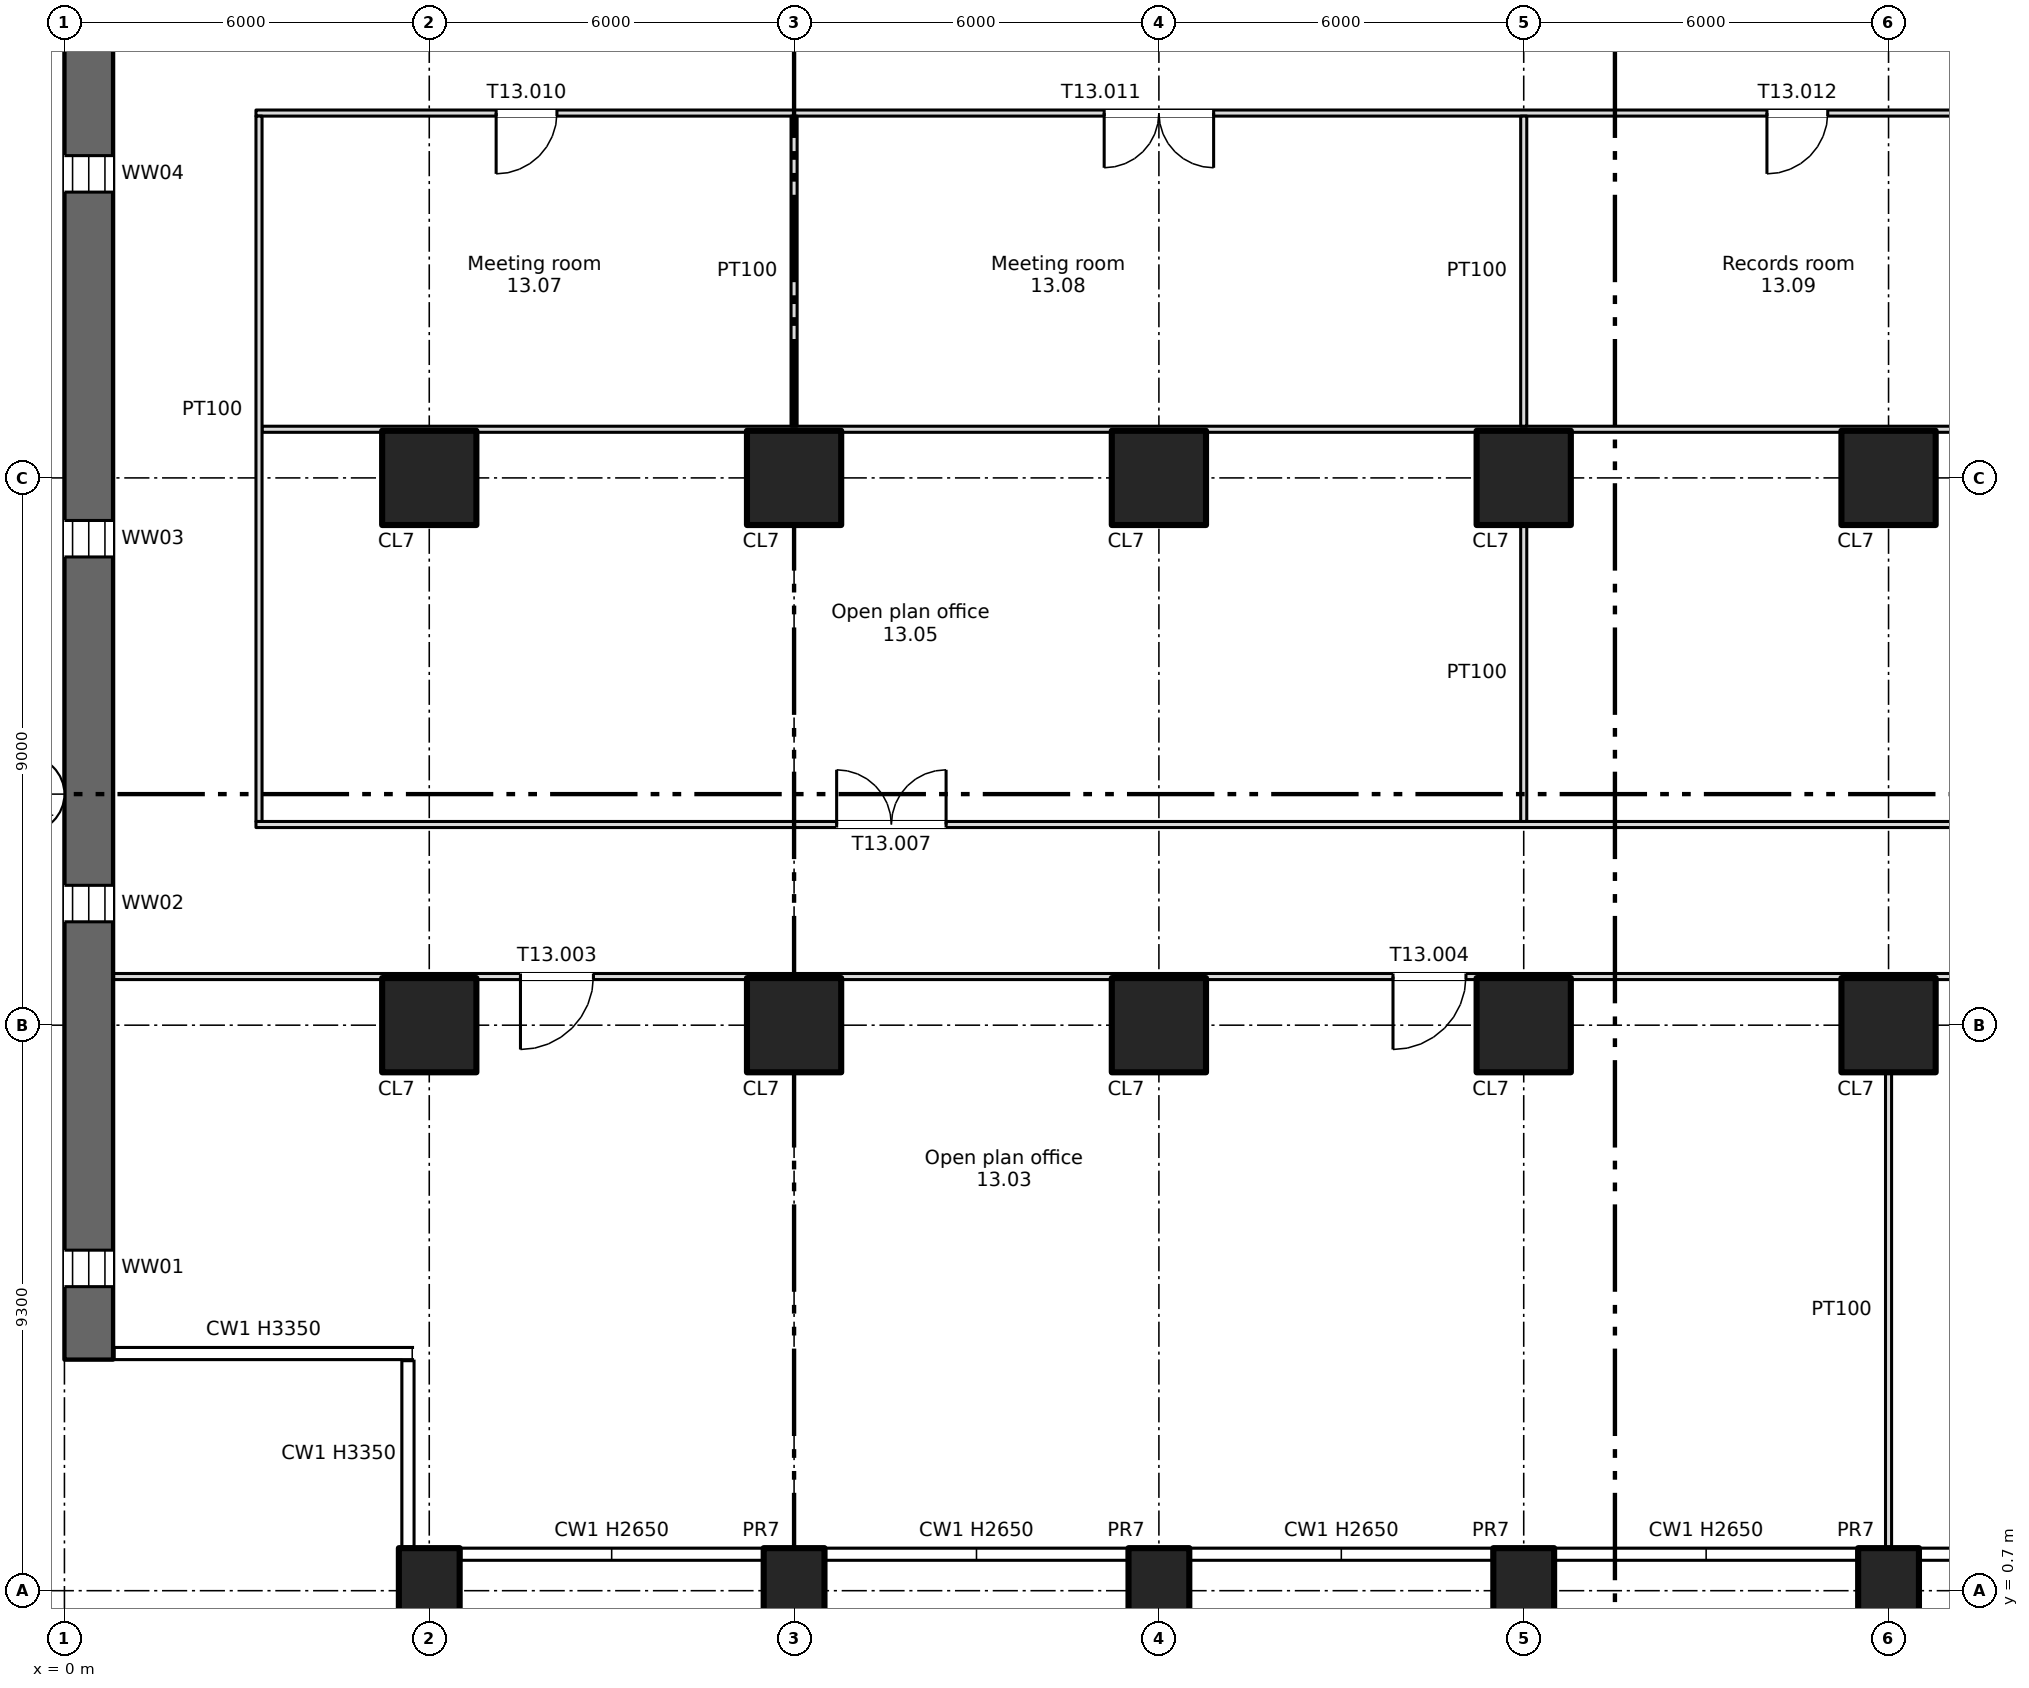
"""IFC4 building model, lengths in metres.
Left out: names, types, materials, properties, quantities, classifications, styles, units other than length and angle.
Written with IfcOpenShell. Run it as: python <this file> out.ifc"""

import sys

from ifc_helpers import new_model, si_unit, direction, frame, frame_2d, origin, origin_2d, place, context, subcontext, project, spatial, rectangle, extrude, element, fill, save


model = new_model("IFC4")
c1 = context("Model", 3, precision=1e-05, world=origin(), true_north=direction((0.0, 1.0)))
c2 = subcontext(c1, "Body", "Model", "MODEL_VIEW")
j1 = project(units=[si_unit("LENGTHUNIT", "METRE"), si_unit("PLANEANGLEUNIT", "RADIAN")], contexts=[c1])
p1 = place(None, origin())
s1 = spatial("IfcSite", under=j1, at=p1, CompositionType="ELEMENT")
p2 = place(p1, origin())
s2 = spatial("IfcBuilding", under=s1, at=p2, CompositionType="ELEMENT")
p3 = place(p2, frame((0.0, 0.0, 75.0)))
s3 = spatial("IfcBuildingStorey", under=s2, at=p3, CompositionType="ELEMENT", Elevation=75.0)
for number, where, z_axis, x_axis in (
    (1, (6.0, 0.7, -0.4), (0.0, 0.0, 1.0), (1.0, 0.0, 0.0)),
    (2, (12.0, 0.7, -0.4), (0.0, 0.0, 1.0), (1.0, 0.0, 0.0)),
    (3, (18.0, 0.7, -0.4), (0.0, 0.0, 1.0), (1.0, 0.0, 0.0)),
    (4, (24.0, 0.7, -0.4), (0.0, 0.0, 1.0), (1.0, 0.0, 0.0)),
    (5, (30.0, 0.7, -0.4), (0.0, 0.0, 1.0), (1.0, 0.0, 0.0)),
):
    element("IfcColumn", number, at=place(p3, frame(where, z_axis=z_axis, x_axis=x_axis)), inside=s3, PredefinedType="COLUMN", context=c2, shape_type="SweptSolid", body=[
        extrude(rectangle(XDim=1.0, YDim=1.4, at=origin_2d()), origin(), (0.0, 0.0, 1.0), 3.75),
    ])
for number, where, z_axis, x_axis in (
    (6, (6.0, 10.0, 0.0), (0.0, 0.0, 1.0), (1.0, 0.0, 0.0)),
    (7, (6.0, 19.0, 0.0), (0.0, 0.0, 1.0), (1.0, 0.0, 0.0)),
    (8, (12.0, 10.0, 0.0), (0.0, 0.0, 1.0), (1.0, 0.0, 0.0)),
    (9, (12.0, 19.0, 0.0), (0.0, 0.0, 1.0), (1.0, 0.0, 0.0)),
    (10, (18.0, 10.0, 0.0), (0.0, 0.0, 1.0), (1.0, 0.0, 0.0)),
    (11, (18.0, 19.0, 0.0), (0.0, 0.0, 1.0), (1.0, 0.0, 0.0)),
    (12, (24.0, 10.0, 0.0), (0.0, 0.0, 1.0), (1.0, 0.0, 0.0)),
    (13, (24.0, 19.0, 0.0), (0.0, 0.0, 1.0), (1.0, 0.0, 0.0)),
    (14, (30.0, 10.0, 0.0), (0.0, 0.0, 1.0), (1.0, 0.0, 0.0)),
    (15, (30.0, 19.0, 0.0), (0.0, 0.0, 1.0), (1.0, 0.0, 0.0)),
):
    element("IfcColumn", number, at=place(p3, frame(where, z_axis=z_axis, x_axis=x_axis)), inside=s3, PredefinedType="COLUMN", context=c2, shape_type="SweptSolid", body=[
        extrude(rectangle(XDim=1.55, YDim=1.55, at=origin_2d()), origin(), (0.0, 0.0, 1.0), 3.35),
    ])
p4 = place(p3, frame((0.4, 4.5, 0.0), z_axis=(0.0, 0.0, 1.0), x_axis=(0.0, 1.0, 0.0)))
e16 = element("IfcWall", 16, at=p4, inside=s3, PredefinedType="SHEAR", context=c2, shape_type="SweptSolid", body=[
    extrude(rectangle(XDim=37.0, YDim=0.8, at=frame_2d((18.5, 0.0))), origin(), (0.0, 0.0, 1.0), 3.35),
])
p5 = place(p4, frame((1.2, 0.0, 0.6)))
e17 = element("IfcOpeningElement", 17, at=p5, cuts=e16, PredefinedType="OPENING", context=c2, shape_type="SweptSolid", body=[
    extrude(rectangle(XDim=0.6, YDim=2.4, at=frame_2d((0.3, 1.2))), frame((0.0, 0.41, 0.0), z_axis=(0.0, -1.0, 0.0), x_axis=(1.0, 0.0, 0.0)), (0.0, 0.0, 1.0), 0.82),
])
p6 = place(p4, frame((7.2, 0.0, 0.6)))
e18 = element("IfcOpeningElement", 18, at=p6, cuts=e16, PredefinedType="OPENING", context=c2, shape_type="SweptSolid", body=[
    extrude(rectangle(XDim=0.6, YDim=2.4, at=frame_2d((0.3, 1.2))), frame((0.0, 0.41, 0.0), z_axis=(0.0, -1.0, 0.0), x_axis=(1.0, 0.0, 0.0)), (0.0, 0.0, 1.0), 0.82),
])
p7 = place(p4, frame((13.2, 0.0, 0.6)))
e19 = element("IfcOpeningElement", 19, at=p7, cuts=e16, PredefinedType="OPENING", context=c2, shape_type="SweptSolid", body=[
    extrude(rectangle(XDim=0.6, YDim=2.4, at=frame_2d((0.3, 1.2))), frame((0.0, 0.41, 0.0), z_axis=(0.0, -1.0, 0.0), x_axis=(1.0, 0.0, 0.0)), (0.0, 0.0, 1.0), 0.82),
])
p8 = place(p4, frame((19.2, 0.0, 0.6)))
e20 = element("IfcOpeningElement", 20, at=p8, cuts=e16, PredefinedType="OPENING", context=c2, shape_type="SweptSolid", body=[
    extrude(rectangle(XDim=0.6, YDim=2.4, at=frame_2d((0.3, 1.2))), frame((0.0, 0.41, 0.0), z_axis=(0.0, -1.0, 0.0), x_axis=(1.0, 0.0, 0.0)), (0.0, 0.0, 1.0), 0.82),
])
p9 = place(p4, frame((25.2, 0.0, 0.6)))
e21 = element("IfcOpeningElement", 21, at=p9, cuts=e16, PredefinedType="OPENING", context=c2, shape_type="SweptSolid", body=[
    extrude(rectangle(XDim=0.6, YDim=2.4, at=frame_2d((0.3, 1.2))), frame((0.0, 0.41, 0.0), z_axis=(0.0, -1.0, 0.0), x_axis=(1.0, 0.0, 0.0)), (0.0, 0.0, 1.0), 0.82),
])
p10 = place(p4, frame((31.2, 0.0, 0.6)))
e22 = element("IfcOpeningElement", 22, at=p10, cuts=e16, PredefinedType="OPENING", context=c2, shape_type="SweptSolid", body=[
    extrude(rectangle(XDim=0.6, YDim=2.4, at=frame_2d((0.3, 1.2))), frame((0.0, 0.41, 0.0), z_axis=(0.0, -1.0, 0.0), x_axis=(1.0, 0.0, 0.0)), (0.0, 0.0, 1.0), 0.82),
])
p11 = place(p3, frame((0.8, 10.8, 0.0), z_axis=(0.0, 0.0, 1.0), x_axis=(1.0, 0.0, 0.0)))
e23 = element("IfcWall", 23, at=p11, inside=s3, PredefinedType="PARTITIONING", context=c2, shape_type="SweptSolid", body=[
    extrude(rectangle(XDim=76.4, YDim=0.1, at=frame_2d((38.2, 0.0))), origin(), (0.0, 0.0, 1.0), 3.35),
])
p12 = place(p11, frame((33.1, 0.0, 0.0)))
e24 = element("IfcOpeningElement", 24, at=p12, cuts=e23, PredefinedType="OPENING", context=c2, shape_type="SweptSolid", body=[
    extrude(rectangle(XDim=1.2, YDim=2.1, at=frame_2d((0.6, 1.05))), frame((0.0, 0.06, 0.0), z_axis=(0.0, -1.0, 0.0), x_axis=(1.0, 0.0, 0.0)), (0.0, 0.0, 1.0), 0.12),
])
p13 = place(p11, frame((42.1, 0.0, 0.0)))
e25 = element("IfcOpeningElement", 25, at=p13, cuts=e23, PredefinedType="OPENING", context=c2, shape_type="SweptSolid", body=[
    extrude(rectangle(XDim=1.2, YDim=2.1, at=frame_2d((0.6, 1.05))), frame((0.0, 0.06, 0.0), z_axis=(0.0, -1.0, 0.0), x_axis=(1.0, 0.0, 0.0)), (0.0, 0.0, 1.0), 0.12),
])
p14 = place(p11, frame((6.7, 0.0, 0.0)))
e26 = element("IfcOpeningElement", 26, at=p14, cuts=e23, PredefinedType="OPENING", context=c2, shape_type="SweptSolid", body=[
    extrude(rectangle(XDim=1.2, YDim=2.1, at=frame_2d((0.6, 1.05))), frame((0.0, 0.06, 0.0), z_axis=(0.0, -1.0, 0.0), x_axis=(1.0, 0.0, 0.0)), (0.0, 0.0, 1.0), 0.12),
])
p15 = place(p11, frame((21.05, 0.0, 0.0)))
e27 = element("IfcOpeningElement", 27, at=p15, cuts=e23, PredefinedType="OPENING", context=c2, shape_type="SweptSolid", body=[
    extrude(rectangle(XDim=1.2, YDim=2.1, at=frame_2d((0.6, 1.05))), frame((0.0, 0.06, 0.0), z_axis=(0.0, -1.0, 0.0), x_axis=(1.0, 0.0, 0.0)), (0.0, 0.0, 1.0), 0.12),
])
p16 = place(p11, frame((54.15, 0.0, 0.0)))
e28 = element("IfcOpeningElement", 28, at=p16, cuts=e23, PredefinedType="OPENING", context=c2, shape_type="SweptSolid", body=[
    extrude(rectangle(XDim=1.2, YDim=2.1, at=frame_2d((0.6, 1.05))), frame((0.0, 0.06, 0.0), z_axis=(0.0, -1.0, 0.0), x_axis=(1.0, 0.0, 0.0)), (0.0, 0.0, 1.0), 0.12),
])
p17 = place(p11, frame((68.5, 0.0, 0.0)))
e29 = element("IfcOpeningElement", 29, at=p17, cuts=e23, PredefinedType="OPENING", context=c2, shape_type="SweptSolid", body=[
    extrude(rectangle(XDim=1.2, YDim=2.1, at=frame_2d((0.6, 1.05))), frame((0.0, 0.06, 0.0), z_axis=(0.0, -1.0, 0.0), x_axis=(1.0, 0.0, 0.0)), (0.0, 0.0, 1.0), 0.12),
])
p18 = place(p3, frame((3.15, 13.3, 0.0), z_axis=(0.0, 0.0, 1.0), x_axis=(1.0, 0.0, 0.0)))
e30 = element("IfcWall", 30, at=p18, inside=s3, PredefinedType="PARTITIONING", context=c2, shape_type="SweptSolid", body=[
    extrude(rectangle(XDim=71.7, YDim=0.1, at=frame_2d((35.85, 0.0))), origin(), (0.0, 0.0, 1.0), 3.35),
])
p19 = place(p18, frame((9.55, 0.0, 0.0)))
e31 = element("IfcOpeningElement", 31, at=p19, cuts=e30, PredefinedType="OPENING", context=c2, shape_type="SweptSolid", body=[
    extrude(rectangle(XDim=1.8, YDim=2.1, at=frame_2d((0.9, 1.05))), frame((0.0, 0.06, 0.0), z_axis=(0.0, -1.0, 0.0), x_axis=(1.0, 0.0, 0.0)), (0.0, 0.0, 1.0), 0.12),
])
p20 = place(p18, frame((32.95, 0.0, 0.0)))
e32 = element("IfcOpeningElement", 32, at=p20, cuts=e30, PredefinedType="OPENING", context=c2, shape_type="SweptSolid", body=[
    extrude(rectangle(XDim=1.2, YDim=2.1, at=frame_2d((0.6, 1.05))), frame((0.0, 0.06, 0.0), z_axis=(0.0, -1.0, 0.0), x_axis=(1.0, 0.0, 0.0)), (0.0, 0.0, 1.0), 0.12),
])
p21 = place(p18, frame((58.35, 0.0, 0.0)))
e33 = element("IfcOpeningElement", 33, at=p21, cuts=e30, PredefinedType="OPENING", context=c2, shape_type="SweptSolid", body=[
    extrude(rectangle(XDim=1.2, YDim=2.1, at=frame_2d((0.6, 1.05))), frame((0.0, 0.06, 0.0), z_axis=(0.0, -1.0, 0.0), x_axis=(1.0, 0.0, 0.0)), (0.0, 0.0, 1.0), 0.12),
])
p22 = place(p3, frame((3.25, 19.8, 0.0), z_axis=(0.0, 0.0, 1.0), x_axis=(1.0, 0.0, 0.0)))
e34 = element("IfcWall", 34, at=p22, inside=s3, PredefinedType="PARTITIONING", context=c2, shape_type="SweptSolid", body=[
    extrude(rectangle(XDim=71.5, YDim=0.1, at=frame_2d((35.75, 0.0))), origin(), (0.0, 0.0, 1.0), 3.35),
])
p23 = place(p3, frame((3.15, 25.0, 0.0), z_axis=(0.0, 0.0, 1.0), x_axis=(1.0, 0.0, 0.0)))
e35 = element("IfcWall", 35, at=p23, inside=s3, PredefinedType="PARTITIONING", context=c2, shape_type="SweptSolid", body=[
    extrude(rectangle(XDim=71.7, YDim=0.1, at=frame_2d((35.85, 0.0))), origin(), (0.0, 0.0, 1.0), 3.35),
])
p24 = place(p23, frame((3.95, 0.0, 0.0)))
e36 = element("IfcOpeningElement", 36, at=p24, cuts=e35, PredefinedType="OPENING", context=c2, shape_type="SweptSolid", body=[
    extrude(rectangle(XDim=1.0, YDim=2.1, at=frame_2d((0.5, 1.05))), frame((0.0, 0.06, 0.0), z_axis=(0.0, -1.0, 0.0), x_axis=(1.0, 0.0, 0.0)), (0.0, 0.0, 1.0), 0.12),
])
p25 = place(p23, frame((13.95, 0.0, 0.0)))
e37 = element("IfcOpeningElement", 37, at=p25, cuts=e35, PredefinedType="OPENING", context=c2, shape_type="SweptSolid", body=[
    extrude(rectangle(XDim=1.8, YDim=2.1, at=frame_2d((0.9, 1.05))), frame((0.0, 0.06, 0.0), z_axis=(0.0, -1.0, 0.0), x_axis=(1.0, 0.0, 0.0)), (0.0, 0.0, 1.0), 0.12),
])
p26 = place(p23, frame((24.85, 0.0, 0.0)))
e38 = element("IfcOpeningElement", 38, at=p26, cuts=e35, PredefinedType="OPENING", context=c2, shape_type="SweptSolid", body=[
    extrude(rectangle(XDim=1.0, YDim=2.1, at=frame_2d((0.5, 1.05))), frame((0.0, 0.06, 0.0), z_axis=(0.0, -1.0, 0.0), x_axis=(1.0, 0.0, 0.0)), (0.0, 0.0, 1.0), 0.12),
])
p27 = place(p23, frame((33.85, 0.0, 0.0)))
e39 = element("IfcOpeningElement", 39, at=p27, cuts=e35, PredefinedType="OPENING", context=c2, shape_type="SweptSolid", body=[
    extrude(rectangle(XDim=1.0, YDim=2.1, at=frame_2d((0.5, 1.05))), frame((0.0, 0.06, 0.0), z_axis=(0.0, -1.0, 0.0), x_axis=(1.0, 0.0, 0.0)), (0.0, 0.0, 1.0), 0.12),
])
p28 = place(p23, frame((43.95, 0.0, 0.0)))
e40 = element("IfcOpeningElement", 40, at=p28, cuts=e35, PredefinedType="OPENING", context=c2, shape_type="SweptSolid", body=[
    extrude(rectangle(XDim=1.8, YDim=2.1, at=frame_2d((0.9, 1.05))), frame((0.0, 0.06, 0.0), z_axis=(0.0, -1.0, 0.0), x_axis=(1.0, 0.0, 0.0)), (0.0, 0.0, 1.0), 0.12),
])
p29 = place(p23, frame((60.35, 0.0, 0.0)))
e41 = element("IfcOpeningElement", 41, at=p29, cuts=e35, PredefinedType="OPENING", context=c2, shape_type="SweptSolid", body=[
    extrude(rectangle(XDim=1.8, YDim=2.1, at=frame_2d((0.9, 1.05))), frame((0.0, 0.06, 0.0), z_axis=(0.0, -1.0, 0.0), x_axis=(1.0, 0.0, 0.0)), (0.0, 0.0, 1.0), 0.12),
])
p30 = place(p3, frame((3.2, 13.35, 0.0), z_axis=(0.0, 0.0, 1.0), x_axis=(0.0, 1.0, 0.0)))
e42 = element("IfcWall", 42, at=p30, inside=s3, PredefinedType="PARTITIONING", context=c2, shape_type="SweptSolid", body=[
    extrude(rectangle(XDim=11.6, YDim=0.1, at=frame_2d((5.8, 0.0))), origin(), (0.0, 0.0, 1.0), 3.35),
])
p31 = place(p3, frame((12.0, 19.85, 0.0), z_axis=(0.0, 0.0, 1.0), x_axis=(0.0, 1.0, 0.0)))
e43 = element("IfcWall", 43, at=p31, inside=s3, PredefinedType="PARTITIONING", context=c2, shape_type="SweptSolid", body=[
    extrude(rectangle(XDim=5.1, YDim=0.1, at=frame_2d((2.55, 0.0))), origin(), (0.0, 0.0, 1.0), 3.35),
])
p32 = place(p3, frame((24.0, 13.35, 0.0), z_axis=(0.0, 0.0, 1.0), x_axis=(0.0, 1.0, 0.0)))
e44 = element("IfcWall", 44, at=p32, inside=s3, PredefinedType="PARTITIONING", context=c2, shape_type="SweptSolid", body=[
    extrude(rectangle(XDim=4.875, YDim=0.1, at=frame_2d((2.438, 0.0))), origin(), (0.0, 0.0, 1.0), 3.35),
])
p33 = place(p3, frame((24.0, 19.85, 0.0), z_axis=(0.0, 0.0, 1.0), x_axis=(0.0, 1.0, 0.0)))
e45 = element("IfcWall", 45, at=p33, inside=s3, PredefinedType="PARTITIONING", context=c2, shape_type="SweptSolid", body=[
    extrude(rectangle(XDim=5.1, YDim=0.1, at=frame_2d((2.55, 0.0))), origin(), (0.0, 0.0, 1.0), 3.35),
])
p34 = place(p3, frame((30.0, 1.4, 0.0), z_axis=(0.0, 0.0, 1.0), x_axis=(0.0, 1.0, 0.0)))
e46 = element("IfcWall", 46, at=p34, inside=s3, PredefinedType="PARTITIONING", context=c2, shape_type="SweptSolid", body=[
    extrude(rectangle(XDim=7.825, YDim=0.1, at=frame_2d((3.913, 0.0))), origin(), (0.0, 0.0, 1.0), 3.35),
])
p35 = place(p5, origin())
e47 = element("IfcWindow", 47, at=p35, inside=s3, PartitioningType="SINGLE_PANEL", PredefinedType="WINDOW", context=c2, shape_type="SweptSolid", body=[
    extrude(rectangle(XDim=0.6, YDim=2.4, at=frame_2d((0.3, 1.2))), frame((0.0, 0.03, 0.0), z_axis=(0.0, -1.0, 0.0), x_axis=(1.0, 0.0, 0.0)), (0.0, 0.0, 1.0), 0.06),
])
fill(e17, e47)
p36 = place(p6, origin())
e48 = element("IfcWindow", 48, at=p36, inside=s3, PartitioningType="SINGLE_PANEL", PredefinedType="WINDOW", context=c2, shape_type="SweptSolid", body=[
    extrude(rectangle(XDim=0.6, YDim=2.4, at=frame_2d((0.3, 1.2))), frame((0.0, 0.03, 0.0), z_axis=(0.0, -1.0, 0.0), x_axis=(1.0, 0.0, 0.0)), (0.0, 0.0, 1.0), 0.06),
])
fill(e18, e48)
p37 = place(p7, origin())
e49 = element("IfcWindow", 49, at=p37, inside=s3, PartitioningType="SINGLE_PANEL", PredefinedType="WINDOW", context=c2, shape_type="SweptSolid", body=[
    extrude(rectangle(XDim=0.6, YDim=2.4, at=frame_2d((0.3, 1.2))), frame((0.0, 0.03, 0.0), z_axis=(0.0, -1.0, 0.0), x_axis=(1.0, 0.0, 0.0)), (0.0, 0.0, 1.0), 0.06),
])
fill(e19, e49)
p38 = place(p8, origin())
e50 = element("IfcWindow", 50, at=p38, inside=s3, PartitioningType="SINGLE_PANEL", PredefinedType="WINDOW", context=c2, shape_type="SweptSolid", body=[
    extrude(rectangle(XDim=0.6, YDim=2.4, at=frame_2d((0.3, 1.2))), frame((0.0, 0.03, 0.0), z_axis=(0.0, -1.0, 0.0), x_axis=(1.0, 0.0, 0.0)), (0.0, 0.0, 1.0), 0.06),
])
fill(e20, e50)
p39 = place(p14, origin())
e51 = element("IfcDoor", 51, at=p39, inside=s3, OperationType="SINGLE_SWING_LEFT", PredefinedType="DOOR", context=c2, shape_type="SweptSolid", body=[
    extrude(rectangle(XDim=1.2, YDim=2.1, at=frame_2d((0.6, 1.05))), frame((0.0, 0.025, 0.0), z_axis=(0.0, -1.0, 0.0), x_axis=(1.0, 0.0, 0.0)), (0.0, 0.0, 1.0), 0.05),
])
fill(e26, e51)
p40 = place(p15, origin())
e52 = element("IfcDoor", 52, at=p40, inside=s3, OperationType="SINGLE_SWING_LEFT", PredefinedType="DOOR", context=c2, shape_type="SweptSolid", body=[
    extrude(rectangle(XDim=1.2, YDim=2.1, at=frame_2d((0.6, 1.05))), frame((0.0, 0.025, 0.0), z_axis=(0.0, -1.0, 0.0), x_axis=(1.0, 0.0, 0.0)), (0.0, 0.0, 1.0), 0.05),
])
fill(e27, e52)
p41 = place(p19, origin())
e53 = element("IfcDoor", 53, at=p41, inside=s3, OperationType="DOUBLE_DOOR_SINGLE_SWING", PredefinedType="DOOR", context=c2, shape_type="SweptSolid", body=[
    extrude(rectangle(XDim=1.8, YDim=2.1, at=frame_2d((0.9, 1.05))), frame((0.0, 0.025, 0.0), z_axis=(0.0, -1.0, 0.0), x_axis=(1.0, 0.0, 0.0)), (0.0, 0.0, 1.0), 0.05),
])
fill(e31, e53)
p42 = place(p24, origin())
e54 = element("IfcDoor", 54, at=p42, inside=s3, OperationType="SINGLE_SWING_LEFT", PredefinedType="DOOR", context=c2, shape_type="SweptSolid", body=[
    extrude(rectangle(XDim=1.0, YDim=2.1, at=frame_2d((0.5, 1.05))), frame((0.0, 0.025, 0.0), z_axis=(0.0, -1.0, 0.0), x_axis=(1.0, 0.0, 0.0)), (0.0, 0.0, 1.0), 0.05),
])
fill(e36, e54)
p43 = place(p25, origin())
e55 = element("IfcDoor", 55, at=p43, inside=s3, OperationType="DOUBLE_DOOR_SINGLE_SWING", PredefinedType="DOOR", context=c2, shape_type="SweptSolid", body=[
    extrude(rectangle(XDim=1.8, YDim=2.1, at=frame_2d((0.9, 1.05))), frame((0.0, 0.025, 0.0), z_axis=(0.0, -1.0, 0.0), x_axis=(1.0, 0.0, 0.0)), (0.0, 0.0, 1.0), 0.05),
])
fill(e37, e55)
p44 = place(p26, origin())
e56 = element("IfcDoor", 56, at=p44, inside=s3, OperationType="SINGLE_SWING_LEFT", PredefinedType="DOOR", context=c2, shape_type="SweptSolid", body=[
    extrude(rectangle(XDim=1.0, YDim=2.1, at=frame_2d((0.5, 1.05))), frame((0.0, 0.025, 0.0), z_axis=(0.0, -1.0, 0.0), x_axis=(1.0, 0.0, 0.0)), (0.0, 0.0, 1.0), 0.05),
])
fill(e38, e56)
save(model, sys.argv[1])
